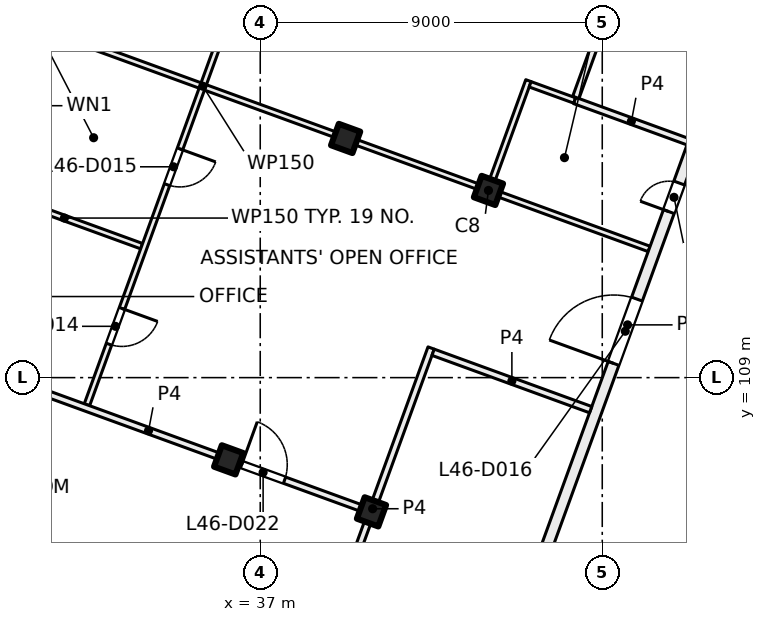
"""IFC4 building model, lengths in metres.
Left out: names, types, materials, properties, quantities, classifications, styles, units other than length and angle.
Written with IfcOpenShell. Run it as: python <this file> out.ifc"""

import sys

from ifc_helpers import new_model, si_unit, direction, frame, frame_2d, origin, origin_2d, place, context, subcontext, project, spatial, rectangle, extrude, element, fill, save


model = new_model("IFC4")
c1 = context("Model", 3, precision=1e-05, world=origin(), true_north=direction((0.0, 1.0)))
c2 = subcontext(c1, "Body", "Model", "MODEL_VIEW")
j1 = project(units=[si_unit("LENGTHUNIT", "METRE"), si_unit("PLANEANGLEUNIT", "RADIAN")], contexts=[c1])
p1 = place(None, origin())
s1 = spatial("IfcSite", under=j1, at=p1, CompositionType="ELEMENT")
p2 = place(p1, origin())
s2 = spatial("IfcBuilding", under=s1, at=p2, CompositionType="ELEMENT")
p3 = place(p2, frame((0.0, 0.0, 196.0)))
s3 = spatial("IfcBuildingStorey", under=s2, at=p3, CompositionType="ELEMENT", Elevation=196.0)
for number, where, z_axis, x_axis in (
    (1, (43.006, 113.925, 0.0), (0.0, 0.0, 1.0), (-0.342, -0.94, 0.0)),
    (2, (39.927, 105.468, 0.0), (0.0, 0.0, 1.0), (-0.342, -0.94, 0.0)),
    (3, (39.247, 115.293, 0.0), (0.0, 0.0, 1.0), (-0.342, -0.94, 0.0)),
    (4, (36.169, 106.836, 0.0), (0.0, 0.0, 1.0), (-0.342, -0.94, 0.0)),
):
    element("IfcColumn", number, at=place(p3, frame(where, z_axis=z_axis, x_axis=x_axis)), inside=s3, PredefinedType="COLUMN", context=c2, shape_type="SweptSolid", body=[
        extrude(rectangle(XDim=0.6, YDim=0.6, at=origin_2d()), origin(), (0.0, 0.0, 1.0), 4.0),
    ])
p4 = place(p3, frame((52.212, 113.783, 0.0), z_axis=(0.0, 0.0, 1.0), x_axis=(-0.34202521188, -0.939690775968, 0.0)))
e5 = element("IfcWall", 5, at=p4, inside=s3, PredefinedType="SOLIDWALL", context=c2, shape_type="SweptSolid", body=[
    extrude(rectangle(XDim=21.745, YDim=0.6, at=frame_2d((10.873, 0.0))), origin(), (0.0, 0.0, 1.0), 3.625),
])
p5 = place(p4, frame((3.765, 0.0, 0.9)))
e6 = element("IfcOpeningElement", 6, at=p5, cuts=e5, PredefinedType="OPENING", context=c2, shape_type="SweptSolid", body=[
    extrude(rectangle(XDim=3.0, YDim=2.4, at=frame_2d((1.5, 1.2))), frame((0.0, 0.31, 0.0), z_axis=(0.0, -1.0, 0.0), x_axis=(1.0, 0.0, 0.0)), (0.0, 0.0, 1.0), 0.62),
])
p6 = place(p4, frame((8.265, 0.0, 0.9)))
e7 = element("IfcOpeningElement", 7, at=p6, cuts=e5, PredefinedType="OPENING", context=c2, shape_type="SweptSolid", body=[
    extrude(rectangle(XDim=3.0, YDim=2.4, at=frame_2d((1.5, 1.2))), frame((0.0, 0.31, 0.0), z_axis=(0.0, -1.0, 0.0), x_axis=(1.0, 0.0, 0.0)), (0.0, 0.0, 1.0), 0.62),
])
p7 = place(p4, frame((12.765, 0.0, 0.9)))
e8 = element("IfcOpeningElement", 8, at=p7, cuts=e5, PredefinedType="OPENING", context=c2, shape_type="SweptSolid", body=[
    extrude(rectangle(XDim=3.0, YDim=2.4, at=frame_2d((1.5, 1.2))), frame((0.0, 0.31, 0.0), z_axis=(0.0, -1.0, 0.0), x_axis=(1.0, 0.0, 0.0)), (0.0, 0.0, 1.0), 0.62),
])
p8 = place(p4, frame((17.265, 0.0, 0.9)))
e9 = element("IfcOpeningElement", 9, at=p8, cuts=e5, PredefinedType="OPENING", context=c2, shape_type="SweptSolid", body=[
    extrude(rectangle(XDim=3.0, YDim=2.4, at=frame_2d((1.5, 1.2))), frame((0.0, 0.31, 0.0), z_axis=(0.0, -1.0, 0.0), x_axis=(1.0, 0.0, 0.0)), (0.0, 0.0, 1.0), 0.62),
])
p9 = place(p3, frame((24.666, 100.669, 0.0), z_axis=(0.0, 0.0, 1.0), x_axis=(0.34201964167, 0.939692803373, 0.0)))
e10 = element("IfcWall", 10, at=p9, inside=s3, PredefinedType="SOLIDWALL", context=c2, shape_type="SweptSolid", body=[
    extrude(rectangle(XDim=32.884, YDim=0.6, at=frame_2d((16.442, 0.0))), origin(), (0.0, 0.0, 1.0), 3.625),
])
p10 = place(p9, frame((1.48, 0.0, 0.9)))
e11 = element("IfcOpeningElement", 11, at=p10, cuts=e10, PredefinedType="OPENING", context=c2, shape_type="SweptSolid", body=[
    extrude(rectangle(XDim=3.0, YDim=2.4, at=frame_2d((1.5, 1.2))), frame((0.0, 0.31, 0.0), z_axis=(0.0, -1.0, 0.0), x_axis=(1.0, 0.0, 0.0)), (0.0, 0.0, 1.0), 0.62),
])
p11 = place(p9, frame((5.98, 0.0, 0.9)))
e12 = element("IfcOpeningElement", 12, at=p11, cuts=e10, PredefinedType="OPENING", context=c2, shape_type="SweptSolid", body=[
    extrude(rectangle(XDim=3.0, YDim=2.4, at=frame_2d((1.5, 1.2))), frame((0.0, 0.31, 0.0), z_axis=(0.0, -1.0, 0.0), x_axis=(1.0, 0.0, 0.0)), (0.0, 0.0, 1.0), 0.62),
])
p12 = place(p9, frame((10.48, 0.0, 0.9)))
e13 = element("IfcOpeningElement", 13, at=p12, cuts=e10, PredefinedType="OPENING", context=c2, shape_type="SweptSolid", body=[
    extrude(rectangle(XDim=3.0, YDim=2.4, at=frame_2d((1.5, 1.2))), frame((0.0, 0.31, 0.0), z_axis=(0.0, -1.0, 0.0), x_axis=(1.0, 0.0, 0.0)), (0.0, 0.0, 1.0), 0.62),
])
p13 = place(p9, frame((14.98, 0.0, 0.9)))
e14 = element("IfcOpeningElement", 14, at=p13, cuts=e10, PredefinedType="OPENING", context=c2, shape_type="SweptSolid", body=[
    extrude(rectangle(XDim=3.0, YDim=2.4, at=frame_2d((1.5, 1.2))), frame((0.0, 0.31, 0.0), z_axis=(0.0, -1.0, 0.0), x_axis=(1.0, 0.0, 0.0)), (0.0, 0.0, 1.0), 0.62),
])
p14 = place(p9, frame((19.48, 0.0, 0.9)))
e15 = element("IfcOpeningElement", 15, at=p14, cuts=e10, PredefinedType="OPENING", context=c2, shape_type="SweptSolid", body=[
    extrude(rectangle(XDim=3.0, YDim=2.4, at=frame_2d((1.5, 1.2))), frame((0.0, 0.31, 0.0), z_axis=(0.0, -1.0, 0.0), x_axis=(1.0, 0.0, 0.0)), (0.0, 0.0, 1.0), 0.62),
])
p15 = place(p9, frame((23.98, 0.0, 0.9)))
e16 = element("IfcOpeningElement", 16, at=p15, cuts=e10, PredefinedType="OPENING", context=c2, shape_type="SweptSolid", body=[
    extrude(rectangle(XDim=3.0, YDim=2.4, at=frame_2d((1.5, 1.2))), frame((0.0, 0.31, 0.0), z_axis=(0.0, -1.0, 0.0), x_axis=(1.0, 0.0, 0.0)), (0.0, 0.0, 1.0), 0.62),
])
p16 = place(p9, frame((28.48, 0.0, 0.9)))
e17 = element("IfcOpeningElement", 17, at=p16, cuts=e10, PredefinedType="OPENING", context=c2, shape_type="SweptSolid", body=[
    extrude(rectangle(XDim=3.0, YDim=2.4, at=frame_2d((1.5, 1.2))), frame((0.0, 0.31, 0.0), z_axis=(0.0, -1.0, 0.0), x_axis=(1.0, 0.0, 0.0)), (0.0, 0.0, 1.0), 0.62),
])
p17 = place(p3, frame((26.736, 105.48, 0.0), z_axis=(0.0, 0.0, 1.0), x_axis=(0.939695108427, -0.342013308511, 0.0)))
e18 = element("IfcWall", 18, at=p17, inside=s3, PredefinedType="PARTITIONING", context=c2, shape_type="SweptSolid", body=[
    extrude(rectangle(XDim=16.9, YDim=0.175, at=frame_2d((8.45, 0.0))), origin(), (0.0, 0.0, 1.0), 3.625),
])
p18 = place(p3, frame((29.814, 113.938, 0.0), z_axis=(0.0, 0.0, 1.0), x_axis=(0.93973078783, -0.341915262023, 0.0)))
e19 = element("IfcWall", 19, at=p18, inside=s3, PredefinedType="PARTITIONING", context=c2, shape_type="SweptSolid", body=[
    extrude(rectangle(XDim=4.326, YDim=0.15, at=frame_2d((2.163, 0.0))), origin(), (0.0, 0.0, 1.0), 3.625),
])
p19 = place(p3, frame((31.353, 118.166, 0.0), z_axis=(0.0, 0.0, 1.0), x_axis=(0.939695108427, -0.342013308511, 0.0)))
e20 = element("IfcWall", 20, at=p19, inside=s3, PredefinedType="PARTITIONING", context=c2, shape_type="SweptSolid", body=[
    extrude(rectangle(XDim=16.9, YDim=0.15, at=frame_2d((8.45, 0.0))), origin(), (0.0, 0.0, 1.0), 3.625),
])
p20 = place(p3, frame((38.54, 125.049, 0.0), z_axis=(0.0, 0.0, 1.0), x_axis=(-0.341960632782, -0.939714278719, 0.0)))
e21 = element("IfcWall", 21, at=p20, inside=s3, PredefinedType="PARTITIONING", context=c2, shape_type="SweptSolid", body=[
    extrude(rectangle(XDim=17.839, YDim=0.15, at=frame_2d((8.919, 0.0))), origin(), (0.0, 0.0, 1.0), 3.625),
])
p21 = place(p20, frame((15.142, 0.0, 0.0)))
e22 = element("IfcOpeningElement", 22, at=p21, cuts=e21, PredefinedType="OPENING", context=c2, shape_type="SweptSolid", body=[
    extrude(rectangle(XDim=1.0, YDim=2.1, at=frame_2d((0.5, 1.05))), frame((0.0, 0.085, 0.0), z_axis=(0.0, -1.0, 0.0), x_axis=(1.0, 0.0, 0.0)), (0.0, 0.0, 1.0), 0.17),
])
p22 = place(p20, frame((10.675, 0.0, 0.0)))
e23 = element("IfcOpeningElement", 23, at=p22, cuts=e21, PredefinedType="OPENING", context=c2, shape_type="SweptSolid", body=[
    extrude(rectangle(XDim=1.0, YDim=2.1, at=frame_2d((0.5, 1.05))), frame((0.0, 0.085, 0.0), z_axis=(0.0, -1.0, 0.0), x_axis=(1.0, 0.0, 0.0)), (0.0, 0.0, 1.0), 0.17),
])
p23 = place(p20, frame((6.176, 0.0, 0.0)))
e24 = element("IfcOpeningElement", 24, at=p23, cuts=e21, PredefinedType="OPENING", context=c2, shape_type="SweptSolid", body=[
    extrude(rectangle(XDim=1.0, YDim=2.1, at=frame_2d((0.5, 1.05))), frame((0.0, 0.085, 0.0), z_axis=(0.0, -1.0, 0.0), x_axis=(1.0, 0.0, 0.0)), (0.0, 0.0, 1.0), 0.17),
])
p24 = place(p20, frame((1.703, 0.0, 0.0)))
e25 = element("IfcOpeningElement", 25, at=p24, cuts=e21, PredefinedType="OPENING", context=c2, shape_type="SweptSolid", body=[
    extrude(rectangle(XDim=1.0, YDim=2.1, at=frame_2d((0.5, 1.05))), frame((0.0, 0.085, 0.0), z_axis=(0.0, -1.0, 0.0), x_axis=(1.0, 0.0, 0.0)), (0.0, 0.0, 1.0), 0.17),
])
p25 = place(p3, frame((38.418, 101.321, 0.0), z_axis=(0.0, 0.0, 1.0), x_axis=(0.342082778631, 0.939669821035, 0.0)))
e26 = element("IfcWall", 26, at=p25, inside=s3, PredefinedType="PARTITIONING", context=c2, shape_type="SweptSolid", body=[
    extrude(rectangle(XDim=9.001, YDim=0.175, at=frame_2d((4.5, 0.0))), origin(), (0.0, 0.0, 1.0), 3.625),
])
p26 = place(p3, frame((28.275, 109.709, 0.0), z_axis=(0.0, 0.0, 1.0), x_axis=(0.939707717516, -0.341978662553, 0.0)))
e27 = element("IfcWall", 27, at=p26, inside=s3, PredefinedType="PARTITIONING", context=c2, shape_type="SweptSolid", body=[
    extrude(rectangle(XDim=12.313, YDim=0.175, at=frame_2d((6.157, 0.0))), origin(), (0.0, 0.0, 1.0), 3.625),
])
p27 = place(p26, frame((8.765, 0.0, 0.0)))
e28 = element("IfcOpeningElement", 28, at=p27, cuts=e27, PredefinedType="OPENING", context=c2, shape_type="SweptSolid", body=[
    extrude(rectangle(XDim=1.2, YDim=2.1, at=frame_2d((0.6, 1.05))), frame((0.0, 0.097, 0.0), z_axis=(0.0, -1.0, 0.0), x_axis=(1.0, 0.0, 0.0)), (0.0, 0.0, 1.0), 0.195),
])
p28 = place(p3, frame((42.728, 99.567, 0.0), z_axis=(0.0, 0.0, 1.0), x_axis=(0.342015412648, 0.939694342598, 0.0)))
e29 = element("IfcWall", 29, at=p28, inside=s3, PredefinedType="PARTITIONING", context=c2, shape_type="SweptSolid", body=[
    extrude(rectangle(XDim=23.031, YDim=0.3, at=frame_2d((11.516, 0.0))), origin(), (0.0, 0.0, 1.0), 3.625),
])
p29 = place(p28, frame((3.987, 0.0, 0.0)))
e30 = element("IfcOpeningElement", 30, at=p29, cuts=e29, PredefinedType="OPENING", context=c2, shape_type="SweptSolid", body=[
    extrude(rectangle(XDim=1.2, YDim=2.1, at=frame_2d((0.6, 1.05))), frame((0.0, 0.16, 0.0), z_axis=(0.0, -1.0, 0.0), x_axis=(1.0, 0.0, 0.0)), (0.0, 0.0, 1.0), 0.32),
])
p30 = place(p28, frame((10.437, 0.0, 0.0)))
e31 = element("IfcOpeningElement", 31, at=p30, cuts=e29, PredefinedType="OPENING", context=c2, shape_type="SweptSolid", body=[
    extrude(rectangle(XDim=1.8, YDim=2.1, at=frame_2d((0.9, 1.05))), frame((0.0, 0.16, 0.0), z_axis=(0.0, -1.0, 0.0), x_axis=(1.0, 0.0, 0.0)), (0.0, 0.0, 1.0), 0.32),
])
p31 = place(p28, frame((14.687, 0.0, 0.0)))
e32 = element("IfcOpeningElement", 32, at=p31, cuts=e29, PredefinedType="OPENING", context=c2, shape_type="SweptSolid", body=[
    extrude(rectangle(XDim=0.8, YDim=2.1, at=frame_2d((0.4, 1.05))), frame((0.0, 0.16, 0.0), z_axis=(0.0, -1.0, 0.0), x_axis=(1.0, 0.0, 0.0)), (0.0, 0.0, 1.0), 0.32),
])
p32 = place(p3, frame((44.058, 116.814, 0.0), z_axis=(0.0, 0.0, 1.0), x_axis=(-0.342063238742, -0.939676934218, 0.0)))
e33 = element("IfcWall", 33, at=p32, inside=s3, PredefinedType="PARTITIONING", context=c2, shape_type="SweptSolid", body=[
    extrude(rectangle(XDim=3.0, YDim=0.15, at=frame_2d((1.5, 0.0))), origin(), (0.0, 0.0, 1.0), 3.625),
])
p33 = place(p3, frame((45.275, 116.292, 0.0), z_axis=(0.0, 0.0, 1.0), x_axis=(-0.93991332754, 0.341413146661, 0.0)))
e34 = element("IfcWall", 34, at=p33, inside=s3, PredefinedType="PARTITIONING", context=c2, shape_type="SweptSolid", body=[
    extrude(rectangle(XDim=1.248, YDim=0.15, at=frame_2d((0.624, 0.0))), origin(), (0.0, 0.0, 1.0), 3.625),
])
p34 = place(p3, frame((45.275, 116.292, 0.0), z_axis=(0.0, 0.0, 1.0), x_axis=(0.939649736865, -0.342137942956, 0.0)))
e35 = element("IfcWall", 35, at=p34, inside=s3, PredefinedType="PARTITIONING", context=c2, shape_type="SweptSolid", body=[
    extrude(rectangle(XDim=3.177, YDim=0.175, at=frame_2d((1.588, 0.0))), origin(), (0.0, 0.0, 1.0), 3.625),
])
p35 = place(p3, frame((45.695, 108.157, 0.0), z_axis=(0.0, 0.0, 1.0), x_axis=(-0.939620446327, 0.342218375959, 0.0)))
e36 = element("IfcWall", 36, at=p35, inside=s3, PredefinedType="PARTITIONING", context=c2, shape_type="SweptSolid", body=[
    extrude(rectangle(XDim=4.412, YDim=0.175, at=frame_2d((2.206, 0.0))), origin(), (0.0, 0.0, 1.0), 3.625),
])
p36 = place(p3, frame((45.305, 116.374, 0.0), z_axis=(0.0, 0.0, 1.0), x_axis=(0.341998803079, 0.939700387726, 0.0)))
e37 = element("IfcWall", 37, at=p36, inside=s3, PredefinedType="PARTITIONING", context=c2, shape_type="SweptSolid", body=[
    extrude(rectangle(XDim=5.825, YDim=0.175, at=frame_2d((2.913, 0.0))), origin(), (0.0, 0.0, 1.0), 3.625),
])
p37 = place(p36, frame((3.312, 0.0, 0.0)))
e38 = element("IfcOpeningElement", 38, at=p37, cuts=e37, PredefinedType="OPENING", context=c2, shape_type="SweptSolid", body=[
    extrude(rectangle(XDim=1.2, YDim=2.1, at=frame_2d((0.6, 1.05))), frame((0.0, 0.097, 0.0), z_axis=(0.0, -1.0, 0.0), x_axis=(1.0, 0.0, 0.0)), (0.0, 0.0, 1.0), 0.195),
])
p38 = place(p21, origin())
e39 = element("IfcDoor", 39, at=p38, inside=s3, OperationType="SINGLE_SWING_LEFT", PredefinedType="DOOR", context=c2, shape_type="SweptSolid", body=[
    extrude(rectangle(XDim=1.0, YDim=2.1, at=frame_2d((0.5, 1.05))), frame((0.0, 0.025, 0.0), z_axis=(0.0, -1.0, 0.0), x_axis=(1.0, 0.0, 0.0)), (0.0, 0.0, 1.0), 0.05),
])
fill(e22, e39)
p39 = place(p22, origin())
e40 = element("IfcDoor", 40, at=p39, inside=s3, OperationType="SINGLE_SWING_LEFT", PredefinedType="DOOR", context=c2, shape_type="SweptSolid", body=[
    extrude(rectangle(XDim=1.0, YDim=2.1, at=frame_2d((0.5, 1.05))), frame((0.0, 0.025, 0.0), z_axis=(0.0, -1.0, 0.0), x_axis=(1.0, 0.0, 0.0)), (0.0, 0.0, 1.0), 0.05),
])
fill(e23, e40)
p40 = place(p30, origin())
e41 = element("IfcDoor", 41, at=p40, inside=s3, OperationType="DOUBLE_DOOR_SINGLE_SWING", PredefinedType="DOOR", context=c2, shape_type="SweptSolid", body=[
    extrude(rectangle(XDim=1.8, YDim=2.1, at=frame_2d((0.9, 1.05))), frame((0.0, 0.025, 0.0), z_axis=(0.0, -1.0, 0.0), x_axis=(1.0, 0.0, 0.0)), (0.0, 0.0, 1.0), 0.05),
])
fill(e31, e41)
p41 = place(p31, origin())
e42 = element("IfcDoor", 42, at=p41, inside=s3, OperationType="SINGLE_SWING_LEFT", PredefinedType="DOOR", context=c2, shape_type="SweptSolid", body=[
    extrude(rectangle(XDim=0.8, YDim=2.1, at=frame_2d((0.4, 1.05))), frame((0.0, 0.025, 0.0), z_axis=(0.0, -1.0, 0.0), x_axis=(1.0, 0.0, 0.0)), (0.0, 0.0, 1.0), 0.05),
])
fill(e32, e42)
p42 = place(p27, origin())
e43 = element("IfcDoor", 43, at=p42, inside=s3, OperationType="DOUBLE_DOOR_SINGLE_SWING", PredefinedType="DOOR", context=c2, shape_type="SweptSolid", body=[
    extrude(rectangle(XDim=1.2, YDim=2.1, at=frame_2d((0.6, 1.05))), frame((0.0, 0.025, 0.0), z_axis=(0.0, -1.0, 0.0), x_axis=(1.0, 0.0, 0.0)), (0.0, 0.0, 1.0), 0.05),
])
fill(e28, e43)
save(model, sys.argv[1])
